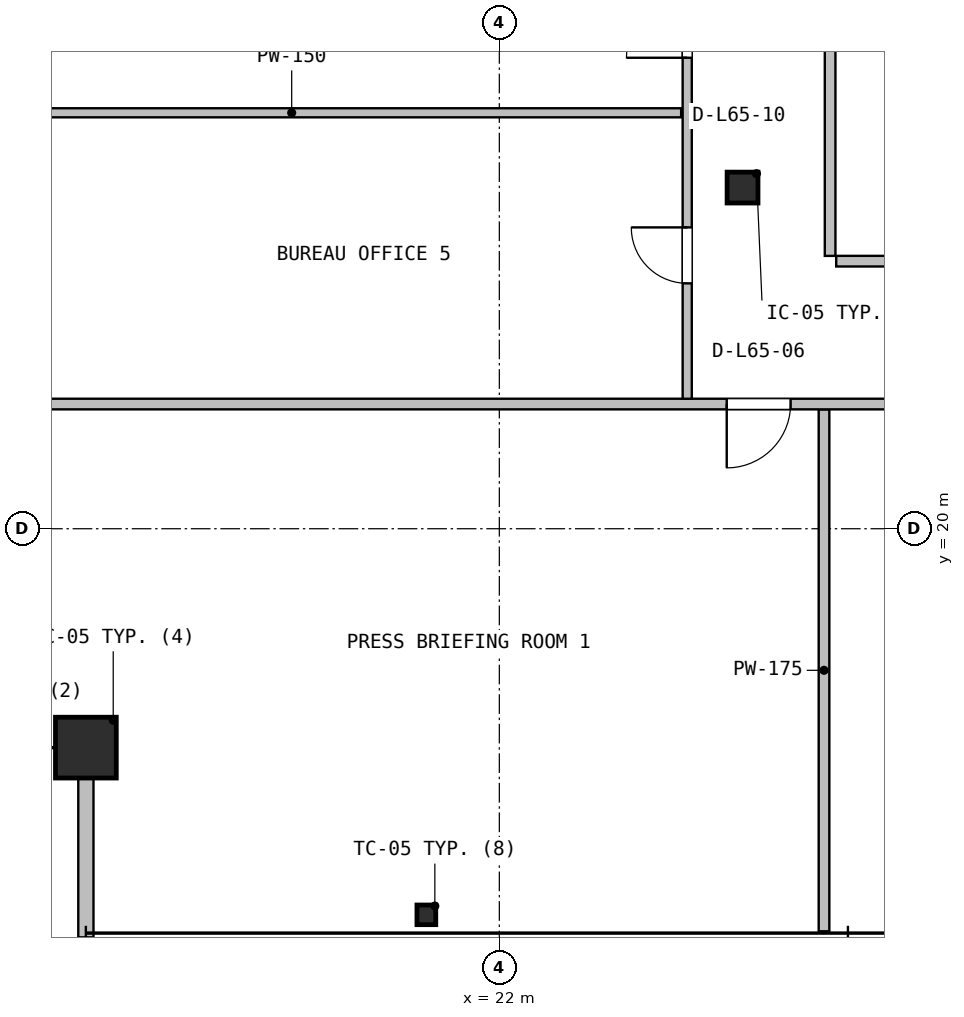
"""IFC4 building model, lengths in metres.
Left out: names, types, materials, properties, quantities, classifications, styles, units other than length and angle.
Written with IfcOpenShell. Run it as: python <this file> out.ifc"""

import sys

from ifc_helpers import new_model, si_unit, direction, frame, frame_2d, origin, origin_2d, place, context, subcontext, project, spatial, rectangle, hollow_rectangle, hollow_circle, i_section, extrude, source, transform, mapped, element, fill, save


model = new_model("IFC4")
c1 = context("Model", 3, precision=1e-05, world=origin(), true_north=direction((0.0, 1.0)))
c2 = subcontext(c1, "Body", "Model", "MODEL_VIEW")
j1 = project(units=[si_unit("LENGTHUNIT", "METRE"), si_unit("PLANEANGLEUNIT", "RADIAN")], contexts=[c1])
p1 = place(None, origin())
s1 = spatial("IfcSite", under=j1, at=p1, CompositionType="ELEMENT")
p2 = place(p1, origin())
s2 = spatial("IfcBuilding", under=s1, at=p2, CompositionType="ELEMENT")
p3 = place(p2, frame((0.0, 0.0, 262.2)))
s3 = spatial("IfcBuildingStorey", under=s2, at=p3, CompositionType="ELEMENT", Elevation=262.2)
m1 = source(origin(), c2, "Body", "SweptSolid", [
    extrude(hollow_rectangle(XDim=1.0, YDim=1.0, WallThickness=0.04, at=origin_2d()), origin(), (0.0, 0.0, 1.0), 3.8),
])
p4 = place(p3, frame((15.2, 16.4, 0.0), z_axis=(0.0, 0.0, 1.0), x_axis=(1.0, 0.0, 0.0)))
e1 = element("IfcColumn", 1, at=p4, inside=s3, PredefinedType="COLUMN", context=c2, shape_type="MappedRepresentation", body=[
    mapped(m1, transform((0.0, 0.0, 0.0), x_axis=(1.0, 0.0, 0.0), y_axis=(0.0, 1.0, 0.0), z_axis=(0.0, 0.0, 1.0), scale=1.0)),
])
m2 = source(origin(), c2, "Body", "SweptSolid", [
    extrude(i_section(OverallWidth=0.309, OverallDepth=0.323, WebThickness=0.014, FlangeThickness=0.023, FilletRadius=0.015, at=origin_2d()), origin(), (0.0, 0.0, 1.0), 3.8),
])
p5 = place(p3, frame((20.8, 13.65, 0.0), z_axis=(0.0, 0.0, 1.0), x_axis=(1.0, 0.0, 0.0)))
e2 = element("IfcColumn", 2, at=p5, inside=s3, PredefinedType="COLUMN", context=c2, shape_type="MappedRepresentation", body=[
    mapped(m2, transform((0.0, 0.0, 0.0), x_axis=(1.0, 0.0, 0.0), y_axis=(0.0, 1.0, 0.0), z_axis=(0.0, 0.0, 1.0), scale=1.0)),
])
m3 = source(origin(), c2, "Body", "SweptSolid", [
    extrude(hollow_circle(Radius=0.254, WallThickness=0.02, at=origin_2d()), origin(), (0.0, 0.0, 1.0), 3.8),
])
p6 = place(p3, frame((26.0, 25.61, 0.0), z_axis=(0.0, 0.0, 1.0), x_axis=(1.0, 0.0, 0.0)))
e3 = element("IfcColumn", 3, at=p6, inside=s3, PredefinedType="COLUMN", context=c2, shape_type="MappedRepresentation", body=[
    mapped(m3, transform((0.0, 0.0, 0.0), x_axis=(1.0, 0.0, 0.0), y_axis=(0.0, 1.0, 0.0), z_axis=(0.0, 0.0, 1.0), scale=1.0)),
])
p7 = place(p3, frame((15.2, 13.28, 0.0), z_axis=(0.0, 0.0, 1.0), x_axis=(0.0, 1.0, 0.0)))
e4 = element("IfcWall", 4, at=p7, inside=s3, PredefinedType="SOLIDWALL", context=c2, shape_type="SweptSolid", body=[
    extrude(rectangle(XDim=3.2, YDim=0.25, at=frame_2d((1.6, 0.0))), origin(), (0.0, 0.0, 1.0), 3.171),
])
p8 = place(p3, frame((27.34, 13.38, 0.0), z_axis=(0.0, 0.0, 1.0), x_axis=(0.0, 1.0, 0.0)))
e5 = element("IfcWall", 5, at=p8, inside=s3, PredefinedType="PARTITIONING", context=c2, shape_type="SweptSolid", body=[
    extrude(rectangle(XDim=8.583, YDim=0.175, at=frame_2d((4.292, 0.0))), origin(), (0.0, 0.0, 1.0), 2.981),
])
p9 = place(p3, frame((12.18, 22.05, 0.0), z_axis=(0.0, 0.0, 1.0), x_axis=(1.0, 0.0, 0.0)))
e6 = element("IfcWall", 6, at=p9, inside=s3, PredefinedType="PARTITIONING", context=c2, shape_type="SweptSolid", body=[
    extrude(rectangle(XDim=43.64, YDim=0.175, at=frame_2d((21.82, 0.0))), origin(), (0.0, 0.0, 1.0), 2.981),
])
p10 = place(p9, frame((13.56, 0.0, 0.0)))
e7 = element("IfcOpeningElement", 7, at=p10, cuts=e6, PredefinedType="OPENING", context=c2, shape_type="SweptSolid", body=[
    extrude(rectangle(XDim=1.05, YDim=2.1, at=frame_2d((0.525, 1.05))), frame((0.0, 0.098, 0.0), z_axis=(0.0, -1.0, 0.0), x_axis=(1.0, 0.0, 0.0)), (0.0, 0.0, 1.0), 0.195),
])
p11 = place(p9, frame((19.335, 0.0, 0.0)))
e8 = element("IfcOpeningElement", 8, at=p11, cuts=e6, PredefinedType="OPENING", context=c2, shape_type="SweptSolid", body=[
    extrude(rectangle(XDim=1.05, YDim=2.1, at=frame_2d((0.525, 1.05))), frame((0.0, 0.098, 0.0), z_axis=(0.0, -1.0, 0.0), x_axis=(1.0, 0.0, 0.0)), (0.0, 0.0, 1.0), 0.195),
])
p12 = place(p9, frame((27.53, 0.0, 0.0)))
e9 = element("IfcOpeningElement", 9, at=p12, cuts=e6, PredefinedType="OPENING", context=c2, shape_type="SweptSolid", body=[
    extrude(rectangle(XDim=1.4, YDim=2.12, at=frame_2d((0.7, 1.06))), frame((0.0, 0.098, 0.0), z_axis=(0.0, -1.0, 0.0), x_axis=(1.0, 0.0, 0.0)), (0.0, 0.0, 1.0), 0.195),
])
p13 = place(p9, frame((32.735, 0.0, 0.0)))
e10 = element("IfcOpeningElement", 10, at=p13, cuts=e6, PredefinedType="OPENING", context=c2, shape_type="SweptSolid", body=[
    extrude(rectangle(XDim=0.88, YDim=2.06, at=frame_2d((0.44, 1.03))), frame((0.0, 0.098, 0.0), z_axis=(0.0, -1.0, 0.0), x_axis=(1.0, 0.0, 0.0)), (0.0, 0.0, 1.0), 0.195),
])
p14 = place(p3, frame((25.09, 22.137, 0.0), z_axis=(0.0, 0.0, 1.0), x_axis=(0.0, 1.0, 0.0)))
e11 = element("IfcWall", 11, at=p14, inside=s3, PredefinedType="PARTITIONING", context=c2, shape_type="SweptSolid", body=[
    extrude(rectangle(XDim=11.126, YDim=0.15, at=frame_2d((5.563, 0.0))), origin(), (0.0, 0.0, 1.0), 2.981),
])
p15 = place(p14, frame((1.898, 0.0, 0.0)))
e12 = element("IfcOpeningElement", 12, at=p15, cuts=e11, PredefinedType="OPENING", context=c2, shape_type="SweptSolid", body=[
    extrude(rectangle(XDim=0.92, YDim=2.08, at=frame_2d((0.46, 1.04))), frame((0.0, 0.085, 0.0), z_axis=(0.0, -1.0, 0.0), x_axis=(1.0, 0.0, 0.0)), (0.0, 0.0, 1.0), 0.17),
])
p16 = place(p14, frame((5.608, 0.0, 0.0)))
e13 = element("IfcOpeningElement", 13, at=p16, cuts=e11, PredefinedType="OPENING", context=c2, shape_type="SweptSolid", body=[
    extrude(rectangle(XDim=1.0, YDim=2.1, at=frame_2d((0.5, 1.05))), frame((0.0, 0.085, 0.0), z_axis=(0.0, -1.0, 0.0), x_axis=(1.0, 0.0, 0.0)), (0.0, 0.0, 1.0), 0.17),
])
p17 = place(p3, frame((12.18, 26.84, 0.0), z_axis=(0.0, 0.0, 1.0), x_axis=(1.0, 0.0, 0.0)))
e14 = element("IfcWall", 14, at=p17, inside=s3, PredefinedType="PARTITIONING", context=c2, shape_type="SweptSolid", body=[
    extrude(rectangle(XDim=12.81, YDim=0.15, at=frame_2d((6.405, 0.0))), origin(), (0.0, 0.0, 1.0), 3.171),
])
p18 = place(p3, frame((27.54, 24.4, 0.0), z_axis=(0.0, 0.0, 1.0), x_axis=(1.0, 0.0, 0.0)))
e15 = element("IfcWall", 15, at=p18, inside=s3, PredefinedType="PARTITIONING", context=c2, shape_type="SweptSolid", body=[
    extrude(rectangle(XDim=16.54, YDim=0.175, at=frame_2d((8.27, 0.0))), origin(), (0.0, 0.0, 1.0), 2.981),
])
p19 = place(p18, frame((7.745, 0.0, 0.0)))
e16 = element("IfcOpeningElement", 16, at=p19, cuts=e15, PredefinedType="OPENING", context=c2, shape_type="SweptSolid", body=[
    extrude(rectangle(XDim=1.05, YDim=2.1, at=frame_2d((0.525, 1.05))), frame((0.0, 0.098, 0.0), z_axis=(0.0, -1.0, 0.0), x_axis=(1.0, 0.0, 0.0)), (0.0, 0.0, 1.0), 0.195),
])
p20 = place(p3, frame((27.44, 24.487, 0.0), z_axis=(0.0, 0.0, 1.0), x_axis=(0.0, 1.0, 0.0)))
e17 = element("IfcWall", 17, at=p20, inside=s3, PredefinedType="PARTITIONING", context=c2, shape_type="SweptSolid", body=[
    extrude(rectangle(XDim=8.776, YDim=0.175, at=frame_2d((4.388, 0.0))), origin(), (0.0, 0.0, 1.0), 2.981),
])
m4 = source(origin(), c2, "Body", "SweptSolid", [
    extrude(rectangle(XDim=1.05, YDim=2.1, at=frame_2d((0.525, 1.05))), frame((0.0, 0.025, 0.0), z_axis=(0.0, -1.0, 0.0), x_axis=(1.0, 0.0, 0.0)), (0.0, 0.0, 1.0), 0.05),
])
p21 = place(p10, frame((1.05, 0.0, 0.0), z_axis=(0.0, 0.0, 1.0), x_axis=(-1.0, 0.0, 0.0)))
e18 = element("IfcDoor", 18, at=p21, inside=s3, OperationType="SINGLE_SWING_LEFT", PredefinedType="DOOR", context=c2, shape_type="MappedRepresentation", body=[
    mapped(m4, transform((0.0, 0.0, 0.0), x_axis=(1.0, 0.0, 0.0), y_axis=(0.0, 1.0, 0.0), z_axis=(0.0, 0.0, 1.0), scale=1.0)),
])
fill(e7, e18)
m5 = source(origin(), c2, "Body", "SweptSolid", [
    extrude(rectangle(XDim=0.92, YDim=2.08, at=frame_2d((0.46, 1.04))), frame((0.0, 0.025, 0.0), z_axis=(0.0, -1.0, 0.0), x_axis=(1.0, 0.0, 0.0)), (0.0, 0.0, 1.0), 0.05),
])
p22 = place(p15, origin())
e19 = element("IfcDoor", 19, at=p22, inside=s3, OperationType="SINGLE_SWING_RIGHT", PredefinedType="DOOR", context=c2, shape_type="MappedRepresentation", body=[
    mapped(m5, transform((0.0, 0.0, 0.0), x_axis=(1.0, 0.0, 0.0), y_axis=(0.0, 1.0, 0.0), z_axis=(0.0, 0.0, 1.0), scale=1.0)),
])
fill(e12, e19)
m6 = source(origin(), c2, "Body", "SweptSolid", [
    extrude(rectangle(XDim=1.0, YDim=2.1, at=frame_2d((0.5, 1.05))), frame((0.0, 0.025, 0.0), z_axis=(0.0, -1.0, 0.0), x_axis=(1.0, 0.0, 0.0)), (0.0, 0.0, 1.0), 0.05),
])
p23 = place(p16, origin())
e20 = element("IfcDoor", 20, at=p23, inside=s3, OperationType="SINGLE_SWING_LEFT", PredefinedType="DOOR", context=c2, shape_type="MappedRepresentation", body=[
    mapped(m6, transform((0.0, 0.0, 0.0), x_axis=(1.0, 0.0, 0.0), y_axis=(0.0, 1.0, 0.0), z_axis=(0.0, 0.0, 1.0), scale=1.0)),
])
fill(e13, e20)
save(model, sys.argv[1])
